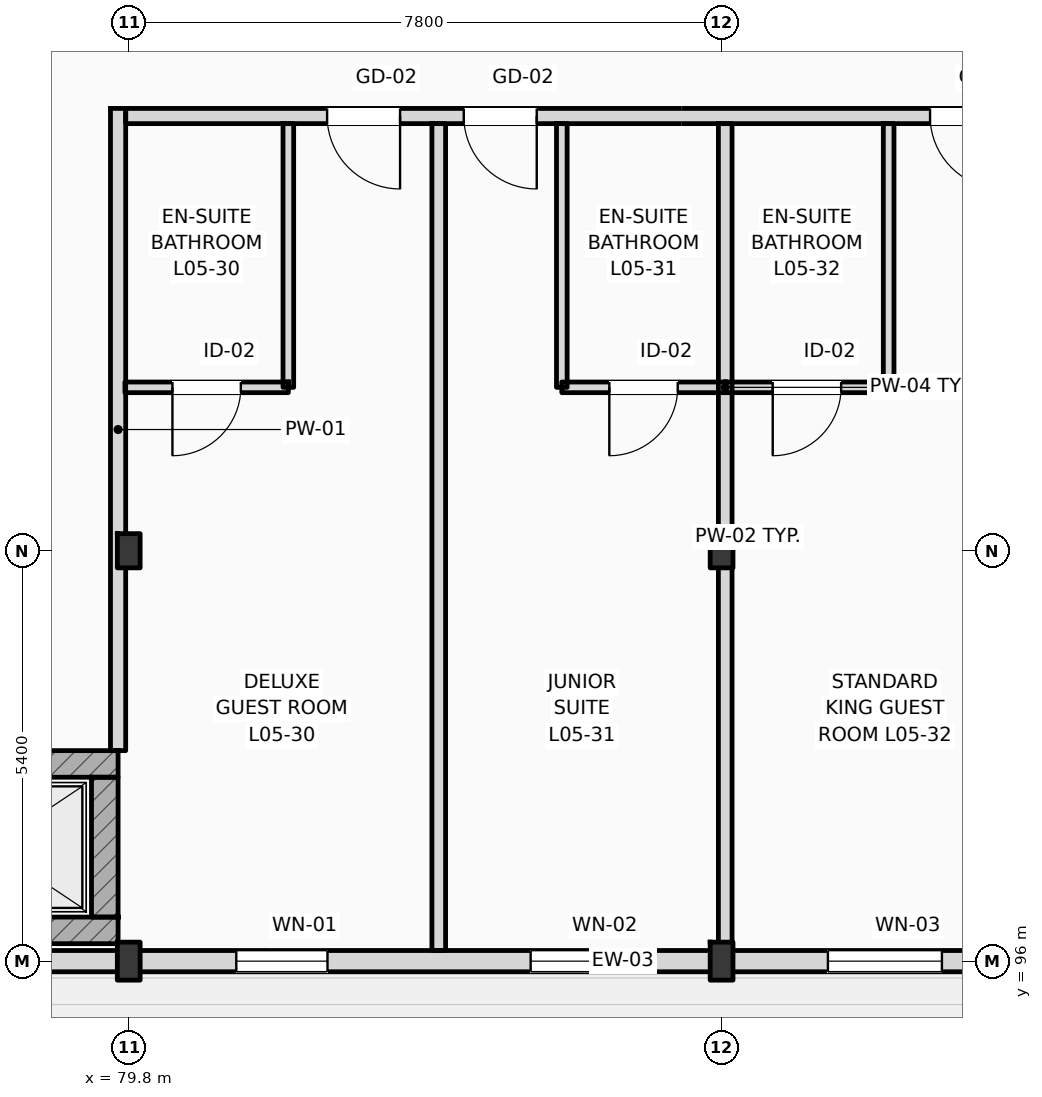
"""IFC4 building model, lengths in metres.
Left out: names, types, materials, properties, quantities, classifications, styles, units other than length and angle.
Written with IfcOpenShell. Run it as: python <this file> out.ifc"""

import sys

from ifc_helpers import new_model, si_unit, direction, frame, frame_2d, origin, origin_2d, place, context, subcontext, project, spatial, rectangle, i_section, extrude, element, fill, save


model = new_model("IFC4")
c1 = context("Model", 3, precision=1e-05, world=origin(), true_north=direction((0.0, 1.0)))
c2 = subcontext(c1, "Body", "Model", "MODEL_VIEW")
j1 = project(units=[si_unit("LENGTHUNIT", "METRE"), si_unit("PLANEANGLEUNIT", "RADIAN")], contexts=[c1])
p1 = place(None, origin())
s1 = spatial("IfcSite", under=j1, at=p1, CompositionType="ELEMENT")
p2 = place(p1, origin())
s2 = spatial("IfcBuilding", under=s1, at=p2, CompositionType="ELEMENT")
p3 = place(p2, frame((0.0, 0.0, 24.6)))
s3 = spatial("IfcBuildingStorey", under=s2, at=p3, CompositionType="ELEMENT", Elevation=24.6)
p4 = place(p3, frame((79.8, 96.0, 0.0), z_axis=(0.0, 0.0, 1.0), x_axis=(1.0, 0.0, 0.0)))
e1 = element("IfcColumn", 1, at=p4, inside=s3, PredefinedType="COLUMN", context=c2, shape_type="SweptSolid", body=[
    extrude(i_section(OverallWidth=0.3, OverallDepth=0.5, WebThickness=0.014, FlangeThickness=0.028, FilletRadius=0.027, at=origin_2d()), origin(), (0.0, 0.0, 1.0), 3.6),
])
p5 = place(p3, frame((79.8, 101.4, 0.0), z_axis=(0.0, 0.0, 1.0), x_axis=(1.0, 0.0, 0.0)))
e2 = element("IfcColumn", 2, at=p5, inside=s3, PredefinedType="COLUMN", context=c2, shape_type="SweptSolid", body=[
    extrude(i_section(OverallWidth=0.3, OverallDepth=0.45, WebThickness=0.014, FlangeThickness=0.026, FilletRadius=0.027, at=origin_2d()), origin(), (0.0, 0.0, 1.0), 3.6),
])
p6 = place(p3, frame((87.6, 96.0, 0.0), z_axis=(0.0, 0.0, 1.0), x_axis=(1.0, 0.0, 0.0)))
e3 = element("IfcColumn", 3, at=p6, inside=s3, PredefinedType="COLUMN", context=c2, shape_type="SweptSolid", body=[
    extrude(i_section(OverallWidth=0.3, OverallDepth=0.5, WebThickness=0.014, FlangeThickness=0.028, FilletRadius=0.027, at=origin_2d()), origin(), (0.0, 0.0, 1.0), 3.6),
])
p7 = place(p3, frame((87.6, 101.4, 0.0), z_axis=(0.0, 0.0, 1.0), x_axis=(1.0, 0.0, 0.0)))
e4 = element("IfcColumn", 4, at=p7, inside=s3, PredefinedType="COLUMN", context=c2, shape_type="SweptSolid", body=[
    extrude(i_section(OverallWidth=0.3, OverallDepth=0.45, WebThickness=0.014, FlangeThickness=0.026, FilletRadius=0.027, at=origin_2d()), origin(), (0.0, 0.0, 1.0), 3.6),
])
p8 = place(p3, frame((25.2, 96.0, 0.0), z_axis=(0.0, 0.0, 1.0), x_axis=(1.0, 0.0, 0.0)))
e5 = element("IfcWall", 5, at=p8, inside=s3, PredefinedType="STANDARD", context=c2, shape_type="SweptSolid", body=[
    extrude(rectangle(XDim=94.8, YDim=0.28, at=frame_2d((47.4, 0.0))), origin(), (0.0, 0.0, 1.0), 2.78),
])
p9 = place(p8, frame((16.539, 0.0, 0.9)))
e6 = element("IfcOpeningElement", 6, at=p9, cuts=e5, PredefinedType="OPENING", context=c2, shape_type="SweptSolid", body=[
    extrude(rectangle(XDim=1.75, YDim=1.7, at=frame_2d((0.875, 0.85))), frame((0.0, 0.15, 0.0), z_axis=(0.0, -1.0, 0.0), x_axis=(1.0, 0.0, 0.0)), (0.0, 0.0, 1.0), 0.3),
])
p10 = place(p8, frame((20.367, 0.0, 0.9)))
e7 = element("IfcOpeningElement", 7, at=p10, cuts=e5, PredefinedType="OPENING", context=c2, shape_type="SweptSolid", body=[
    extrude(rectangle(XDim=2.0, YDim=1.7, at=frame_2d((1.0, 0.85))), frame((0.0, 0.15, 0.0), z_axis=(0.0, -1.0, 0.0), x_axis=(1.0, 0.0, 0.0)), (0.0, 0.0, 1.0), 0.3),
])
p11 = place(p8, frame((24.326, 0.0, 0.9)))
e8 = element("IfcOpeningElement", 8, at=p11, cuts=e5, PredefinedType="OPENING", context=c2, shape_type="SweptSolid", body=[
    extrude(rectangle(XDim=2.3, YDim=1.7, at=frame_2d((1.15, 0.85))), frame((0.0, 0.15, 0.0), z_axis=(0.0, -1.0, 0.0), x_axis=(1.0, 0.0, 0.0)), (0.0, 0.0, 1.0), 0.3),
])
p12 = place(p8, frame((27.684, 0.0, 0.9)))
e9 = element("IfcOpeningElement", 9, at=p12, cuts=e5, PredefinedType="OPENING", context=c2, shape_type="SweptSolid", body=[
    extrude(rectangle(XDim=2.6, YDim=1.7, at=frame_2d((1.3, 0.85))), frame((0.0, 0.15, 0.0), z_axis=(0.0, -1.0, 0.0), x_axis=(1.0, 0.0, 0.0)), (0.0, 0.0, 1.0), 0.3),
])
p13 = place(p8, frame((32.083, 0.0, 0.9)))
e10 = element("IfcOpeningElement", 10, at=p13, cuts=e5, PredefinedType="OPENING", context=c2, shape_type="SweptSolid", body=[
    extrude(rectangle(XDim=2.419, YDim=1.7, at=frame_2d((1.209, 0.85))), frame((0.0, 0.15, 0.0), z_axis=(0.0, -1.0, 0.0), x_axis=(1.0, 0.0, 0.0)), (0.0, 0.0, 1.0), 0.3),
])
p14 = place(p8, frame((35.322, 0.0, 0.9)))
e11 = element("IfcOpeningElement", 11, at=p14, cuts=e5, PredefinedType="OPENING", context=c2, shape_type="SweptSolid", body=[
    extrude(rectangle(XDim=2.868, YDim=1.7, at=frame_2d((1.434, 0.85))), frame((0.0, 0.15, 0.0), z_axis=(0.0, -1.0, 0.0), x_axis=(1.0, 0.0, 0.0)), (0.0, 0.0, 1.0), 0.3),
])
p15 = place(p8, frame((56.015, 0.0, 0.9)))
e12 = element("IfcOpeningElement", 12, at=p15, cuts=e5, PredefinedType="OPENING", context=c2, shape_type="SweptSolid", body=[
    extrude(rectangle(XDim=1.2, YDim=1.7, at=frame_2d((0.6, 0.85))), frame((0.0, 0.15, 0.0), z_axis=(0.0, -1.0, 0.0), x_axis=(1.0, 0.0, 0.0)), (0.0, 0.0, 1.0), 0.3),
])
p16 = place(p8, frame((59.888, 0.0, 0.9)))
e13 = element("IfcOpeningElement", 13, at=p16, cuts=e5, PredefinedType="OPENING", context=c2, shape_type="SweptSolid", body=[
    extrude(rectangle(XDim=1.35, YDim=1.7, at=frame_2d((0.675, 0.85))), frame((0.0, 0.15, 0.0), z_axis=(0.0, -1.0, 0.0), x_axis=(1.0, 0.0, 0.0)), (0.0, 0.0, 1.0), 0.3),
])
p17 = place(p8, frame((63.799, 0.0, 0.9)))
e14 = element("IfcOpeningElement", 14, at=p17, cuts=e5, PredefinedType="OPENING", context=c2, shape_type="SweptSolid", body=[
    extrude(rectangle(XDim=1.5, YDim=1.7, at=frame_2d((0.75, 0.85))), frame((0.0, 0.15, 0.0), z_axis=(0.0, -1.0, 0.0), x_axis=(1.0, 0.0, 0.0)), (0.0, 0.0, 1.0), 0.3),
])
p18 = place(p8, frame((67.709, 0.0, 0.9)))
e15 = element("IfcOpeningElement", 15, at=p18, cuts=e5, PredefinedType="OPENING", context=c2, shape_type="SweptSolid", body=[
    extrude(rectangle(XDim=1.65, YDim=1.7, at=frame_2d((0.825, 0.85))), frame((0.0, 0.15, 0.0), z_axis=(0.0, -1.0, 0.0), x_axis=(1.0, 0.0, 0.0)), (0.0, 0.0, 1.0), 0.3),
])
p19 = place(p8, frame((71.618, 0.0, 0.9)))
e16 = element("IfcOpeningElement", 16, at=p19, cuts=e5, PredefinedType="OPENING", context=c2, shape_type="SweptSolid", body=[
    extrude(rectangle(XDim=1.8, YDim=1.7, at=frame_2d((0.9, 0.85))), frame((0.0, 0.15, 0.0), z_axis=(0.0, -1.0, 0.0), x_axis=(1.0, 0.0, 0.0)), (0.0, 0.0, 1.0), 0.3),
])
p20 = place(p8, frame((75.129, 0.0, 0.9)))
e17 = element("IfcOpeningElement", 17, at=p20, cuts=e5, PredefinedType="OPENING", context=c2, shape_type="SweptSolid", body=[
    extrude(rectangle(XDim=1.95, YDim=1.7, at=frame_2d((0.975, 0.85))), frame((0.0, 0.15, 0.0), z_axis=(0.0, -1.0, 0.0), x_axis=(1.0, 0.0, 0.0)), (0.0, 0.0, 1.0), 0.3),
])
p21 = place(p8, frame((79.439, 0.0, 0.9)))
e18 = element("IfcOpeningElement", 18, at=p21, cuts=e5, PredefinedType="OPENING", context=c2, shape_type="SweptSolid", body=[
    extrude(rectangle(XDim=2.1, YDim=1.7, at=frame_2d((1.05, 0.85))), frame((0.0, 0.15, 0.0), z_axis=(0.0, -1.0, 0.0), x_axis=(1.0, 0.0, 0.0)), (0.0, 0.0, 1.0), 0.3),
])
p22 = place(p8, frame((83.349, 0.0, 0.9)))
e19 = element("IfcOpeningElement", 19, at=p22, cuts=e5, PredefinedType="OPENING", context=c2, shape_type="SweptSolid", body=[
    extrude(rectangle(XDim=2.25, YDim=1.7, at=frame_2d((1.125, 0.85))), frame((0.0, 0.15, 0.0), z_axis=(0.0, -1.0, 0.0), x_axis=(1.0, 0.0, 0.0)), (0.0, 0.0, 1.0), 0.3),
])
p23 = place(p8, frame((87.258, 0.0, 0.9)))
e20 = element("IfcOpeningElement", 20, at=p23, cuts=e5, PredefinedType="OPENING", context=c2, shape_type="SweptSolid", body=[
    extrude(rectangle(XDim=2.4, YDim=1.7, at=frame_2d((1.2, 0.85))), frame((0.0, 0.15, 0.0), z_axis=(0.0, -1.0, 0.0), x_axis=(1.0, 0.0, 0.0)), (0.0, 0.0, 1.0), 0.3),
])
p24 = place(p8, frame((91.204, 0.0, 0.9)))
e21 = element("IfcOpeningElement", 21, at=p24, cuts=e5, PredefinedType="OPENING", context=c2, shape_type="SweptSolid", body=[
    extrude(rectangle(XDim=2.55, YDim=1.7, at=frame_2d((1.275, 0.85))), frame((0.0, 0.15, 0.0), z_axis=(0.0, -1.0, 0.0), x_axis=(1.0, 0.0, 0.0)), (0.0, 0.0, 1.0), 0.3),
])
p25 = place(p3, frame((76.67, 98.595, 0.0), z_axis=(0.0, 0.0, 1.0), x_axis=(1.0, 0.0, 0.0)))
e22 = element("IfcWall", 22, at=p25, inside=s3, PredefinedType="SHEAR", context=c2, shape_type="SweptSolid", body=[
    extrude(rectangle(XDim=2.99, YDim=0.35, at=frame_2d((1.495, 0.0))), origin(), (0.0, 0.0, 1.0), 3.34),
])
p26 = place(p25, frame((0.695, 0.0, 0.0)))
e23 = element("IfcOpeningElement", 23, at=p26, cuts=e22, PredefinedType="OPENING", context=c2, shape_type="SweptSolid", body=[
    extrude(rectangle(XDim=1.25, YDim=2.25, at=frame_2d((0.625, 1.125))), frame((0.0, 0.185, 0.0), z_axis=(0.0, -1.0, 0.0), x_axis=(1.0, 0.0, 0.0)), (0.0, 0.0, 1.0), 0.37),
])
p27 = place(p3, frame((76.67, 96.405, 0.0), z_axis=(0.0, 0.0, 1.0), x_axis=(1.0, 0.0, 0.0)))
e24 = element("IfcWall", 24, at=p27, inside=s3, PredefinedType="SHEAR", context=c2, shape_type="SweptSolid", body=[
    extrude(rectangle(XDim=2.99, YDim=0.35, at=frame_2d((1.495, 0.0))), origin(), (0.0, 0.0, 1.0), 3.34),
])
p28 = place(p3, frame((79.485, 96.58, 0.0), z_axis=(0.0, 0.0, 1.0), x_axis=(0.0, 1.0, 0.0)))
e25 = element("IfcWall", 25, at=p28, inside=s3, PredefinedType="SHEAR", context=c2, shape_type="SweptSolid", body=[
    extrude(rectangle(XDim=1.84, YDim=0.35, at=frame_2d((0.92, 0.0))), origin(), (0.0, 0.0, 1.0), 2.93),
])
p29 = place(p3, frame((79.76, 107.12, 0.0), z_axis=(0.0, 0.0, 1.0), x_axis=(1.0, 0.0, 0.0)))
e26 = element("IfcWall", 26, at=p29, inside=s3, PredefinedType="PARTITIONING", context=c2, shape_type="SweptSolid", body=[
    extrude(rectangle(XDim=40.1, YDim=0.2, at=frame_2d((20.05, 0.0))), origin(), (0.0, 0.0, 1.0), 3.34),
])
p30 = place(p29, frame((2.65, 0.0, 0.0)))
e27 = element("IfcOpeningElement", 27, at=p30, cuts=e26, PredefinedType="OPENING", context=c2, shape_type="SweptSolid", body=[
    extrude(rectangle(XDim=0.96, YDim=2.2, at=frame_2d((0.48, 1.1))), frame((0.0, 0.11, 0.0), z_axis=(0.0, -1.0, 0.0), x_axis=(1.0, 0.0, 0.0)), (0.0, 0.0, 1.0), 0.22),
])
p31 = place(p29, frame((4.448, 0.0, 0.0)))
e28 = element("IfcOpeningElement", 28, at=p31, cuts=e26, PredefinedType="OPENING", context=c2, shape_type="SweptSolid", body=[
    extrude(rectangle(XDim=0.96, YDim=2.2, at=frame_2d((0.48, 1.1))), frame((0.0, 0.11, 0.0), z_axis=(0.0, -1.0, 0.0), x_axis=(1.0, 0.0, 0.0)), (0.0, 0.0, 1.0), 0.22),
])
p32 = place(p29, frame((10.583, 0.0, 0.0)))
e29 = element("IfcOpeningElement", 29, at=p32, cuts=e26, PredefinedType="OPENING", context=c2, shape_type="SweptSolid", body=[
    extrude(rectangle(XDim=0.96, YDim=2.2, at=frame_2d((0.48, 1.1))), frame((0.0, 0.11, 0.0), z_axis=(0.0, -1.0, 0.0), x_axis=(1.0, 0.0, 0.0)), (0.0, 0.0, 1.0), 0.22),
])
p33 = place(p29, frame((12.418, 0.0, 0.0)))
e30 = element("IfcOpeningElement", 30, at=p33, cuts=e26, PredefinedType="OPENING", context=c2, shape_type="SweptSolid", body=[
    extrude(rectangle(XDim=0.96, YDim=2.2, at=frame_2d((0.48, 1.1))), frame((0.0, 0.11, 0.0), z_axis=(0.0, -1.0, 0.0), x_axis=(1.0, 0.0, 0.0)), (0.0, 0.0, 1.0), 0.22),
])
p34 = place(p29, frame((18.553, 0.0, 0.0)))
e31 = element("IfcOpeningElement", 31, at=p34, cuts=e26, PredefinedType="OPENING", context=c2, shape_type="SweptSolid", body=[
    extrude(rectangle(XDim=0.96, YDim=2.2, at=frame_2d((0.48, 1.1))), frame((0.0, 0.11, 0.0), z_axis=(0.0, -1.0, 0.0), x_axis=(1.0, 0.0, 0.0)), (0.0, 0.0, 1.0), 0.22),
])
p35 = place(p29, frame((20.388, 0.0, 0.0)))
e32 = element("IfcOpeningElement", 32, at=p35, cuts=e26, PredefinedType="OPENING", context=c2, shape_type="SweptSolid", body=[
    extrude(rectangle(XDim=0.96, YDim=2.2, at=frame_2d((0.48, 1.1))), frame((0.0, 0.11, 0.0), z_axis=(0.0, -1.0, 0.0), x_axis=(1.0, 0.0, 0.0)), (0.0, 0.0, 1.0), 0.22),
])
p36 = place(p29, frame((26.523, 0.0, 0.0)))
e33 = element("IfcOpeningElement", 33, at=p36, cuts=e26, PredefinedType="OPENING", context=c2, shape_type="SweptSolid", body=[
    extrude(rectangle(XDim=0.96, YDim=2.2, at=frame_2d((0.48, 1.1))), frame((0.0, 0.11, 0.0), z_axis=(0.0, -1.0, 0.0), x_axis=(1.0, 0.0, 0.0)), (0.0, 0.0, 1.0), 0.22),
])
p37 = place(p29, frame((28.358, 0.0, 0.0)))
e34 = element("IfcOpeningElement", 34, at=p37, cuts=e26, PredefinedType="OPENING", context=c2, shape_type="SweptSolid", body=[
    extrude(rectangle(XDim=0.96, YDim=2.2, at=frame_2d((0.48, 1.1))), frame((0.0, 0.11, 0.0), z_axis=(0.0, -1.0, 0.0), x_axis=(1.0, 0.0, 0.0)), (0.0, 0.0, 1.0), 0.22),
])
p38 = place(p29, frame((34.493, 0.0, 0.0)))
e35 = element("IfcOpeningElement", 35, at=p38, cuts=e26, PredefinedType="OPENING", context=c2, shape_type="SweptSolid", body=[
    extrude(rectangle(XDim=0.96, YDim=2.2, at=frame_2d((0.48, 1.1))), frame((0.0, 0.11, 0.0), z_axis=(0.0, -1.0, 0.0), x_axis=(1.0, 0.0, 0.0)), (0.0, 0.0, 1.0), 0.22),
])
p39 = place(p29, frame((36.364, 0.0, 0.0)))
e36 = element("IfcOpeningElement", 36, at=p39, cuts=e26, PredefinedType="OPENING", context=c2, shape_type="SweptSolid", body=[
    extrude(rectangle(XDim=0.96, YDim=2.2, at=frame_2d((0.48, 1.1))), frame((0.0, 0.11, 0.0), z_axis=(0.0, -1.0, 0.0), x_axis=(1.0, 0.0, 0.0)), (0.0, 0.0, 1.0), 0.22),
])
p40 = place(p3, frame((79.66, 98.77, 0.0), z_axis=(0.0, 0.0, 1.0), x_axis=(0.0, 1.0, 0.0)))
e37 = element("IfcWall", 37, at=p40, inside=s3, PredefinedType="PARTITIONING", context=c2, shape_type="SweptSolid", body=[
    extrude(rectangle(XDim=8.45, YDim=0.2, at=frame_2d((4.225, 0.0))), origin(), (0.0, 0.0, 1.0), 2.93),
])
p41 = place(p3, frame((83.879, 96.14, 0.0), z_axis=(0.0, 0.0, 1.0), x_axis=(0.0, 1.0, 0.0)))
e38 = element("IfcWall", 38, at=p41, inside=s3, PredefinedType="PARTITIONING", context=c2, shape_type="SweptSolid", body=[
    extrude(rectangle(XDim=10.88, YDim=0.18, at=frame_2d((5.44, 0.0))), origin(), (0.0, 0.0, 1.0), 3.34),
])
p42 = place(p3, frame((81.9, 103.55, 0.0), z_axis=(0.0, 0.0, 1.0), x_axis=(0.0, 1.0, 0.0)))
e39 = element("IfcWall", 39, at=p42, inside=s3, PredefinedType="PARTITIONING", context=c2, shape_type="SweptSolid", body=[
    extrude(rectangle(XDim=3.47, YDim=0.14, at=frame_2d((1.735, 0.0))), origin(), (0.0, 0.0, 1.0), 3.34),
])
p43 = place(p3, frame((79.75, 103.55, 0.0), z_axis=(0.0, 0.0, 1.0), x_axis=(1.0, 0.0, 0.0)))
e40 = element("IfcWall", 40, at=p43, inside=s3, PredefinedType="PARTITIONING", context=c2, shape_type="SweptSolid", body=[
    extrude(rectangle(XDim=2.15, YDim=0.14, at=frame_2d((1.075, 0.0))), origin(), (0.0, 0.0, 1.0), 3.34),
])
p44 = place(p43, frame((0.625, 0.0, 0.0)))
e41 = element("IfcOpeningElement", 41, at=p44, cuts=e40, PredefinedType="OPENING", context=c2, shape_type="SweptSolid", body=[
    extrude(rectangle(XDim=0.9, YDim=2.1, at=frame_2d((0.45, 1.05))), frame((0.0, 0.08, 0.0), z_axis=(0.0, -1.0, 0.0), x_axis=(1.0, 0.0, 0.0)), (0.0, 0.0, 1.0), 0.16),
])
p45 = place(p3, frame((87.648, 96.14, 0.0), z_axis=(0.0, 0.0, 1.0), x_axis=(0.0, 1.0, 0.0)))
e42 = element("IfcWall", 42, at=p45, inside=s3, PredefinedType="PARTITIONING", context=c2, shape_type="SweptSolid", body=[
    extrude(rectangle(XDim=10.88, YDim=0.18, at=frame_2d((5.44, 0.0))), origin(), (0.0, 0.0, 1.0), 2.93),
])
p46 = place(p3, frame((85.498, 103.55, 0.0), z_axis=(0.0, 0.0, 1.0), x_axis=(0.0, 1.0, 0.0)))
e43 = element("IfcWall", 43, at=p46, inside=s3, PredefinedType="PARTITIONING", context=c2, shape_type="SweptSolid", body=[
    extrude(rectangle(XDim=3.47, YDim=0.14, at=frame_2d((1.735, 0.0))), origin(), (0.0, 0.0, 1.0), 3.34),
])
p47 = place(p3, frame((85.498, 103.55, 0.0), z_axis=(0.0, 0.0, 1.0), x_axis=(1.0, 0.0, 0.0)))
e44 = element("IfcWall", 44, at=p47, inside=s3, PredefinedType="PARTITIONING", context=c2, shape_type="SweptSolid", body=[
    extrude(rectangle(XDim=2.15, YDim=0.14, at=frame_2d((1.075, 0.0))), origin(), (0.0, 0.0, 1.0), 3.34),
])
p48 = place(p47, frame((0.625, 0.0, 0.0)))
e45 = element("IfcOpeningElement", 45, at=p48, cuts=e44, PredefinedType="OPENING", context=c2, shape_type="SweptSolid", body=[
    extrude(rectangle(XDim=0.9, YDim=2.1, at=frame_2d((0.45, 1.05))), frame((0.0, 0.08, 0.0), z_axis=(0.0, -1.0, 0.0), x_axis=(1.0, 0.0, 0.0)), (0.0, 0.0, 1.0), 0.16),
])
p49 = place(p3, frame((89.798, 103.55, 0.0), z_axis=(0.0, 0.0, 1.0), x_axis=(0.0, 1.0, 0.0)))
e46 = element("IfcWall", 46, at=p49, inside=s3, PredefinedType="PARTITIONING", context=c2, shape_type="SweptSolid", body=[
    extrude(rectangle(XDim=3.47, YDim=0.14, at=frame_2d((1.735, 0.0))), origin(), (0.0, 0.0, 1.0), 3.34),
])
p50 = place(p3, frame((87.648, 103.55, 0.0), z_axis=(0.0, 0.0, 1.0), x_axis=(1.0, 0.0, 0.0)))
e47 = element("IfcWall", 47, at=p50, inside=s3, PredefinedType="PARTITIONING", context=c2, shape_type="SweptSolid", body=[
    extrude(rectangle(XDim=2.15, YDim=0.14, at=frame_2d((1.075, 0.0))), origin(), (0.0, 0.0, 1.0), 3.34),
])
p51 = place(p50, frame((0.625, 0.0, 0.0)))
e48 = element("IfcOpeningElement", 48, at=p51, cuts=e47, PredefinedType="OPENING", context=c2, shape_type="SweptSolid", body=[
    extrude(rectangle(XDim=0.9, YDim=2.1, at=frame_2d((0.45, 1.05))), frame((0.0, 0.08, 0.0), z_axis=(0.0, -1.0, 0.0), x_axis=(1.0, 0.0, 0.0)), (0.0, 0.0, 1.0), 0.16),
])
p52 = place(p15, origin())
e49 = element("IfcWindow", 49, at=p52, inside=s3, PartitioningType="DOUBLE_PANEL_VERTICAL", PredefinedType="WINDOW", context=c2, shape_type="SweptSolid", body=[
    extrude(rectangle(XDim=1.2, YDim=1.7, at=frame_2d((0.6, 0.85))), frame((0.0, 0.03, 0.0), z_axis=(0.0, -1.0, 0.0), x_axis=(1.0, 0.0, 0.0)), (0.0, 0.0, 1.0), 0.06),
])
fill(e12, e49)
p53 = place(p16, origin())
e50 = element("IfcWindow", 50, at=p53, inside=s3, PartitioningType="DOUBLE_PANEL_VERTICAL", PredefinedType="WINDOW", context=c2, shape_type="SweptSolid", body=[
    extrude(rectangle(XDim=1.35, YDim=1.7, at=frame_2d((0.675, 0.85))), frame((0.0, 0.03, 0.0), z_axis=(0.0, -1.0, 0.0), x_axis=(1.0, 0.0, 0.0)), (0.0, 0.0, 1.0), 0.06),
])
fill(e13, e50)
p54 = place(p17, origin())
e51 = element("IfcWindow", 51, at=p54, inside=s3, PartitioningType="DOUBLE_PANEL_VERTICAL", PredefinedType="WINDOW", context=c2, shape_type="SweptSolid", body=[
    extrude(rectangle(XDim=1.5, YDim=1.7, at=frame_2d((0.75, 0.85))), frame((0.0, 0.03, 0.0), z_axis=(0.0, -1.0, 0.0), x_axis=(1.0, 0.0, 0.0)), (0.0, 0.0, 1.0), 0.06),
])
fill(e14, e51)
p55 = place(p30, frame((0.96, 0.0, 0.0), z_axis=(0.0, 0.0, 1.0), x_axis=(-1.0, 0.0, 0.0)))
e52 = element("IfcDoor", 52, at=p55, inside=s3, OperationType="SINGLE_SWING_RIGHT", PredefinedType="DOOR", context=c2, shape_type="SweptSolid", body=[
    extrude(rectangle(XDim=0.96, YDim=2.2, at=frame_2d((0.48, 1.1))), frame((0.0, 0.025, 0.0), z_axis=(0.0, -1.0, 0.0), x_axis=(1.0, 0.0, 0.0)), (0.0, 0.0, 1.0), 0.05),
])
fill(e27, e52)
p56 = place(p44, frame((0.9, 0.0, 0.0), z_axis=(0.0, 0.0, 1.0), x_axis=(-1.0, 0.0, 0.0)))
e53 = element("IfcDoor", 53, at=p56, inside=s3, OperationType="SINGLE_SWING_LEFT", PredefinedType="DOOR", context=c2, shape_type="SweptSolid", body=[
    extrude(rectangle(XDim=0.9, YDim=2.1, at=frame_2d((0.45, 1.05))), frame((0.0, 0.025, 0.0), z_axis=(0.0, -1.0, 0.0), x_axis=(1.0, 0.0, 0.0)), (0.0, 0.0, 1.0), 0.05),
])
fill(e41, e53)
p57 = place(p31, frame((0.96, 0.0, 0.0), z_axis=(0.0, 0.0, 1.0), x_axis=(-1.0, 0.0, 0.0)))
e54 = element("IfcDoor", 54, at=p57, inside=s3, OperationType="SINGLE_SWING_RIGHT", PredefinedType="DOOR", context=c2, shape_type="SweptSolid", body=[
    extrude(rectangle(XDim=0.96, YDim=2.2, at=frame_2d((0.48, 1.1))), frame((0.0, 0.025, 0.0), z_axis=(0.0, -1.0, 0.0), x_axis=(1.0, 0.0, 0.0)), (0.0, 0.0, 1.0), 0.05),
])
fill(e28, e54)
p58 = place(p48, frame((0.9, 0.0, 0.0), z_axis=(0.0, 0.0, 1.0), x_axis=(-1.0, 0.0, 0.0)))
e55 = element("IfcDoor", 55, at=p58, inside=s3, OperationType="SINGLE_SWING_LEFT", PredefinedType="DOOR", context=c2, shape_type="SweptSolid", body=[
    extrude(rectangle(XDim=0.9, YDim=2.1, at=frame_2d((0.45, 1.05))), frame((0.0, 0.025, 0.0), z_axis=(0.0, -1.0, 0.0), x_axis=(1.0, 0.0, 0.0)), (0.0, 0.0, 1.0), 0.05),
])
fill(e45, e55)
p59 = place(p32, frame((0.96, 0.0, 0.0), z_axis=(0.0, 0.0, 1.0), x_axis=(-1.0, 0.0, 0.0)))
e56 = element("IfcDoor", 56, at=p59, inside=s3, OperationType="SINGLE_SWING_RIGHT", PredefinedType="DOOR", context=c2, shape_type="SweptSolid", body=[
    extrude(rectangle(XDim=0.96, YDim=2.2, at=frame_2d((0.48, 1.1))), frame((0.0, 0.025, 0.0), z_axis=(0.0, -1.0, 0.0), x_axis=(1.0, 0.0, 0.0)), (0.0, 0.0, 1.0), 0.05),
])
fill(e29, e56)
p60 = place(p51, frame((0.9, 0.0, 0.0), z_axis=(0.0, 0.0, 1.0), x_axis=(-1.0, 0.0, 0.0)))
e57 = element("IfcDoor", 57, at=p60, inside=s3, OperationType="SINGLE_SWING_LEFT", PredefinedType="DOOR", context=c2, shape_type="SweptSolid", body=[
    extrude(rectangle(XDim=0.9, YDim=2.1, at=frame_2d((0.45, 1.05))), frame((0.0, 0.025, 0.0), z_axis=(0.0, -1.0, 0.0), x_axis=(1.0, 0.0, 0.0)), (0.0, 0.0, 1.0), 0.05),
])
fill(e48, e57)
save(model, sys.argv[1])
